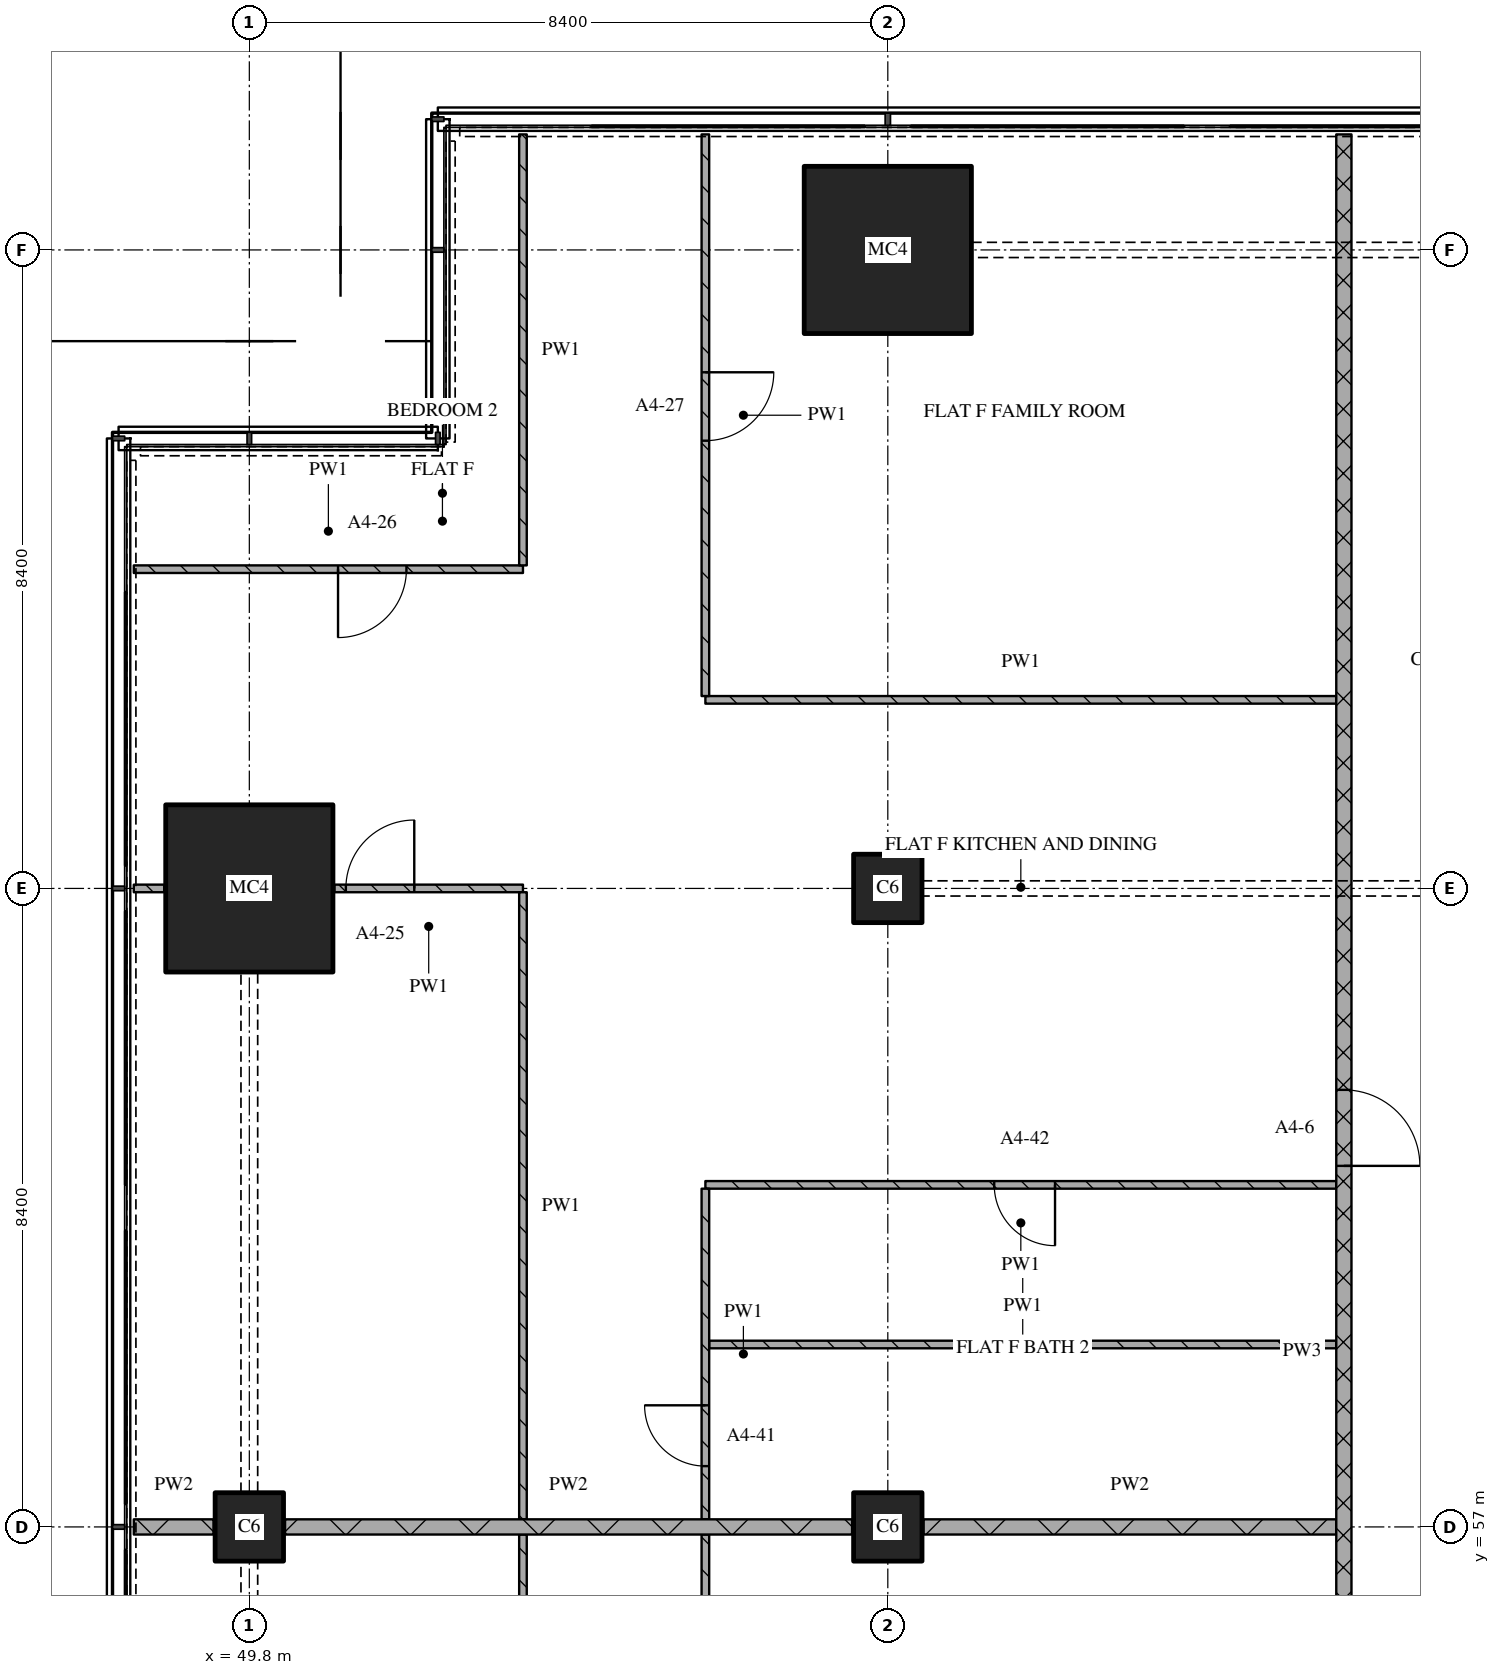
"""IFC4 building model, lengths in metres.
Left out: names, types, materials, properties, quantities, classifications, styles, units other than length and angle.
Written with IfcOpenShell. Run it as: python <this file> out.ifc"""

import sys

from ifc_helpers import new_model, si_unit, direction, frame, frame_2d, origin, origin_2d, place, context, subcontext, project, spatial, rectangle, extrude, element, fill, save


model = new_model("IFC4")
c1 = context("Model", 3, precision=1e-05, world=origin(), true_north=direction((0.0, 1.0)))
c2 = subcontext(c1, "Body", "Model", "MODEL_VIEW")
j1 = project(units=[si_unit("LENGTHUNIT", "METRE"), si_unit("PLANEANGLEUNIT", "RADIAN")], contexts=[c1])
p1 = place(None, origin())
s1 = spatial("IfcSite", under=j1, at=p1, CompositionType="ELEMENT")
p2 = place(p1, origin())
s2 = spatial("IfcBuilding", under=s1, at=p2, CompositionType="ELEMENT")
p3 = place(p2, frame((0.0, 0.0, 69.6)))
s3 = spatial("IfcBuildingStorey", under=s2, at=p3, CompositionType="ELEMENT", Elevation=69.6)
p4 = place(p3, frame((49.8, 57.0, 0.0), z_axis=(0.0, 0.0, 1.0), x_axis=(1.0, 0.0, 0.0)))
e1 = element("IfcColumn", 1, at=p4, inside=s3, PredefinedType="COLUMN", context=c2, shape_type="SweptSolid", body=[
    extrude(rectangle(XDim=0.9, YDim=0.9, at=origin_2d()), origin(), (0.0, 0.0, 1.0), 3.6),
])
p5 = place(p3, frame((49.8, 65.4, 0.0), z_axis=(0.0, 0.0, 1.0), x_axis=(1.0, 0.0, 0.0)))
e2 = element("IfcColumn", 2, at=p5, inside=s3, PredefinedType="COLUMN", context=c2, shape_type="SweptSolid", body=[
    extrude(rectangle(XDim=2.2, YDim=2.2, at=origin_2d()), origin(), (0.0, 0.0, 1.0), 3.6),
])
for number, where, z_axis, x_axis in (
    (3, (58.2, 57.0, 0.0), (0.0, 0.0, 1.0), (1.0, 0.0, 0.0)),
    (4, (58.2, 65.4, 0.0), (0.0, 0.0, 1.0), (1.0, 0.0, 0.0)),
):
    element("IfcColumn", number, at=place(p3, frame(where, z_axis=z_axis, x_axis=x_axis)), inside=s3, PredefinedType="COLUMN", context=c2, shape_type="SweptSolid", body=[
        extrude(rectangle(XDim=0.9, YDim=0.9, at=origin_2d()), origin(), (0.0, 0.0, 1.0), 3.6),
    ])
p6 = place(p3, frame((58.2, 73.8, 0.0), z_axis=(0.0, 0.0, 1.0), x_axis=(1.0, 0.0, 0.0)))
e5 = element("IfcColumn", 5, at=p6, inside=s3, PredefinedType="COLUMN", context=c2, shape_type="SweptSolid", body=[
    extrude(rectangle(XDim=2.2, YDim=2.2, at=origin_2d()), origin(), (0.0, 0.0, 1.0), 3.6),
])
p7 = place(p3, frame((48.28, 57.0, 0.0), z_axis=(0.0, 0.0, 1.0), x_axis=(1.0, 0.0, 0.0)))
e6 = element("IfcWall", 6, at=p7, inside=s3, PredefinedType="PARTITIONING", context=c2, shape_type="SweptSolid", body=[
    extrude(rectangle(XDim=1.05, YDim=0.2, at=frame_2d((0.525, 0.0))), origin(), (0.0, 0.0, 1.0), 3.32),
])
p8 = place(p3, frame((50.27, 57.0, 0.0), z_axis=(0.0, 0.0, 1.0), x_axis=(1.0, 0.0, 0.0)))
e7 = element("IfcWall", 7, at=p8, inside=s3, PredefinedType="PARTITIONING", context=c2, shape_type="SweptSolid", body=[
    extrude(rectangle(XDim=7.46, YDim=0.2, at=frame_2d((3.73, 0.0))), origin(), (0.0, 0.0, 1.0), 3.32),
])
p9 = place(p3, frame((58.67, 57.0, 0.0), z_axis=(0.0, 0.0, 1.0), x_axis=(1.0, 0.0, 0.0)))
e8 = element("IfcWall", 8, at=p9, inside=s3, PredefinedType="PARTITIONING", context=c2, shape_type="SweptSolid", body=[
    extrude(rectangle(XDim=5.43, YDim=0.2, at=frame_2d((2.715, 0.0))), origin(), (0.0, 0.0, 1.0), 3.32),
])
p10 = place(p3, frame((55.85, 59.4, 0.0), z_axis=(0.0, 0.0, 1.0), x_axis=(1.0, 0.0, 0.0)))
e9 = element("IfcWall", 9, at=p10, inside=s3, PredefinedType="PARTITIONING", context=c2, shape_type="SweptSolid", body=[
    extrude(rectangle(XDim=8.25, YDim=0.1, at=frame_2d((4.125, 0.0))), origin(), (0.0, 0.0, 1.0), 3.32),
])
p11 = place(p3, frame((64.1, 61.5, 0.0), z_axis=(0.0, 0.0, 1.0), x_axis=(-1.0, 0.0, 0.0)))
e10 = element("IfcWall", 10, at=p11, inside=s3, PredefinedType="PARTITIONING", context=c2, shape_type="SweptSolid", body=[
    extrude(rectangle(XDim=8.3, YDim=0.1, at=frame_2d((4.15, 0.0))), origin(), (0.0, 0.0, 1.0), 3.32),
])
p12 = place(p11, frame((3.7, 0.0, 0.0)))
e11 = element("IfcOpeningElement", 11, at=p12, cuts=e10, PredefinedType="OPENING", context=c2, shape_type="SweptSolid", body=[
    extrude(rectangle(XDim=0.8, YDim=2.1, at=frame_2d((0.4, 1.05))), frame((0.0, 0.06, 0.0), z_axis=(0.0, -1.0, 0.0), x_axis=(1.0, 0.0, 0.0)), (0.0, 0.0, 1.0), 0.12),
])
p13 = place(p3, frame((48.28, 65.4, 0.0), z_axis=(0.0, 0.0, 1.0), x_axis=(1.0, 0.0, 0.0)))
e12 = element("IfcWall", 12, at=p13, inside=s3, PredefinedType="PARTITIONING", context=c2, shape_type="SweptSolid", body=[
    extrude(rectangle(XDim=0.4, YDim=0.1, at=frame_2d((0.2, 0.0))), origin(), (0.0, 0.0, 1.0), 3.32),
])
p14 = place(p3, frame((53.4, 65.4, 0.0), z_axis=(0.0, 0.0, 1.0), x_axis=(-1.0, 0.0, 0.0)))
e13 = element("IfcWall", 13, at=p14, inside=s3, PredefinedType="PARTITIONING", context=c2, shape_type="SweptSolid", body=[
    extrude(rectangle(XDim=2.48, YDim=0.1, at=frame_2d((1.24, 0.0))), origin(), (0.0, 0.0, 1.0), 3.32),
])
p15 = place(p14, frame((1.43, 0.0, 0.0)))
e14 = element("IfcOpeningElement", 14, at=p15, cuts=e13, PredefinedType="OPENING", context=c2, shape_type="SweptSolid", body=[
    extrude(rectangle(XDim=0.9, YDim=2.1, at=frame_2d((0.45, 1.05))), frame((0.0, 0.06, 0.0), z_axis=(0.0, -1.0, 0.0), x_axis=(1.0, 0.0, 0.0)), (0.0, 0.0, 1.0), 0.12),
])
p16 = place(p3, frame((55.8, 67.881, 0.0), z_axis=(0.0, 0.0, 1.0), x_axis=(1.0, 0.0, 0.0)))
e15 = element("IfcWall", 15, at=p16, inside=s3, PredefinedType="PARTITIONING", context=c2, shape_type="SweptSolid", body=[
    extrude(rectangle(XDim=8.3, YDim=0.1, at=frame_2d((4.15, 0.0))), origin(), (0.0, 0.0, 1.0), 3.32),
])
p17 = place(p3, frame((48.28, 69.6, 0.0), z_axis=(0.0, 0.0, 1.0), x_axis=(1.0, 0.0, 0.0)))
e16 = element("IfcWall", 16, at=p17, inside=s3, PredefinedType="PARTITIONING", context=c2, shape_type="SweptSolid", body=[
    extrude(rectangle(XDim=5.12, YDim=0.1, at=frame_2d((2.56, 0.0))), origin(), (0.0, 0.0, 1.0), 3.32),
])
p18 = place(p17, frame((2.687, 0.0, 0.0)))
e17 = element("IfcOpeningElement", 17, at=p18, cuts=e16, PredefinedType="OPENING", context=c2, shape_type="SweptSolid", body=[
    extrude(rectangle(XDim=0.9, YDim=2.1, at=frame_2d((0.45, 1.05))), frame((0.0, 0.06, 0.0), z_axis=(0.0, -1.0, 0.0), x_axis=(1.0, 0.0, 0.0)), (0.0, 0.0, 1.0), 0.12),
])
p19 = place(p3, frame((53.4, 75.32, 0.0), z_axis=(0.0, 0.0, 1.0), x_axis=(0.0, -1.0, 0.0)))
e18 = element("IfcWall", 18, at=p19, inside=s3, PredefinedType="PARTITIONING", context=c2, shape_type="SweptSolid", body=[
    extrude(rectangle(XDim=5.67, YDim=0.1, at=frame_2d((2.835, 0.0))), origin(), (0.0, 0.0, 1.0), 3.32),
])
p20 = place(p3, frame((55.8, 75.32, 0.0), z_axis=(0.0, 0.0, 1.0), x_axis=(0.0, -1.0, 0.0)))
e19 = element("IfcWall", 19, at=p20, inside=s3, PredefinedType="PARTITIONING", context=c2, shape_type="SweptSolid", body=[
    extrude(rectangle(XDim=7.389, YDim=0.1, at=frame_2d((3.695, 0.0))), origin(), (0.0, 0.0, 1.0), 3.32),
])
p21 = place(p20, frame((3.129, 0.0, 0.0)))
e20 = element("IfcOpeningElement", 20, at=p21, cuts=e19, PredefinedType="OPENING", context=c2, shape_type="SweptSolid", body=[
    extrude(rectangle(XDim=0.9, YDim=2.1, at=frame_2d((0.45, 1.05))), frame((0.0, 0.06, 0.0), z_axis=(0.0, -1.0, 0.0), x_axis=(1.0, 0.0, 0.0)), (0.0, 0.0, 1.0), 0.12),
])
p22 = place(p3, frame((64.2, 43.3, 0.0), z_axis=(0.0, 0.0, 1.0), x_axis=(0.0, 1.0, 0.0)))
e21 = element("IfcWall", 21, at=p22, inside=s3, PredefinedType="PARTITIONING", context=c2, shape_type="SweptSolid", body=[
    extrude(rectangle(XDim=32.02, YDim=0.2, at=frame_2d((16.01, 0.0))), origin(), (0.0, 0.0, 1.0), 3.32),
])
p23 = place(p22, frame((9.15, 0.0, 0.0)))
e22 = element("IfcOpeningElement", 22, at=p23, cuts=e21, PredefinedType="OPENING", context=c2, shape_type="SweptSolid", body=[
    extrude(rectangle(XDim=1.0, YDim=2.1, at=frame_2d((0.5, 1.05))), frame((0.0, 0.11, 0.0), z_axis=(0.0, -1.0, 0.0), x_axis=(1.0, 0.0, 0.0)), (0.0, 0.0, 1.0), 0.22),
])
p24 = place(p22, frame((18.45, 0.0, 0.0)))
e23 = element("IfcOpeningElement", 23, at=p24, cuts=e21, PredefinedType="OPENING", context=c2, shape_type="SweptSolid", body=[
    extrude(rectangle(XDim=1.0, YDim=2.1, at=frame_2d((0.5, 1.05))), frame((0.0, 0.11, 0.0), z_axis=(0.0, -1.0, 0.0), x_axis=(1.0, 0.0, 0.0)), (0.0, 0.0, 1.0), 0.22),
])
for number, where, z_axis, x_axis in (
    (24, (53.4, 56.9, 0.0), (0.0, 0.0, 1.0), (0.0, -1.0, 0.0)),
    (25, (53.4, 65.35, 0.0), (0.0, 0.0, 1.0), (0.0, -1.0, 0.0)),
):
    element("IfcWall", number, at=place(p3, frame(where, z_axis=z_axis, x_axis=x_axis)), inside=s3, PredefinedType="PARTITIONING", context=c2, shape_type="SweptSolid", body=[
        extrude(rectangle(XDim=8.25, YDim=0.1, at=frame_2d((4.125, 0.0))), origin(), (0.0, 0.0, 1.0), 3.32),
    ])
p25 = place(p3, frame((55.8, 56.9, 0.0), z_axis=(0.0, 0.0, 1.0), x_axis=(0.0, -1.0, 0.0)))
e26 = element("IfcWall", 26, at=p25, inside=s3, PredefinedType="PARTITIONING", context=c2, shape_type="SweptSolid", body=[
    extrude(rectangle(XDim=3.15, YDim=0.1, at=frame_2d((1.575, 0.0))), origin(), (0.0, 0.0, 1.0), 3.32),
])
p26 = place(p3, frame((55.8, 61.45, 0.0), z_axis=(0.0, 0.0, 1.0), x_axis=(0.0, -1.0, 0.0)))
e27 = element("IfcWall", 27, at=p26, inside=s3, PredefinedType="PARTITIONING", context=c2, shape_type="SweptSolid", body=[
    extrude(rectangle(XDim=4.35, YDim=0.1, at=frame_2d((2.175, 0.0))), origin(), (0.0, 0.0, 1.0), 3.32),
])
p27 = place(p26, frame((2.85, 0.0, 0.0)))
e28 = element("IfcOpeningElement", 28, at=p27, cuts=e27, PredefinedType="OPENING", context=c2, shape_type="SweptSolid", body=[
    extrude(rectangle(XDim=0.8, YDim=2.1, at=frame_2d((0.4, 1.05))), frame((0.0, 0.06, 0.0), z_axis=(0.0, -1.0, 0.0), x_axis=(1.0, 0.0, 0.0)), (0.0, 0.0, 1.0), 0.12),
])
p28 = place(p12, origin())
e29 = element("IfcDoor", 29, at=p28, inside=s3, OperationType="SINGLE_SWING_LEFT", PredefinedType="DOOR", context=c2, shape_type="SweptSolid", body=[
    extrude(rectangle(XDim=0.8, YDim=2.1, at=frame_2d((0.4, 1.05))), frame((0.0, 0.025, 0.0), z_axis=(0.0, -1.0, 0.0), x_axis=(1.0, 0.0, 0.0)), (0.0, 0.0, 1.0), 0.05),
])
fill(e11, e29)
p29 = place(p15, origin())
e30 = element("IfcDoor", 30, at=p29, inside=s3, OperationType="SINGLE_SWING_RIGHT", PredefinedType="DOOR", context=c2, shape_type="SweptSolid", body=[
    extrude(rectangle(XDim=0.9, YDim=2.1, at=frame_2d((0.45, 1.05))), frame((0.0, 0.025, 0.0), z_axis=(0.0, -1.0, 0.0), x_axis=(1.0, 0.0, 0.0)), (0.0, 0.0, 1.0), 0.05),
])
fill(e14, e30)
p30 = place(p18, origin())
e31 = element("IfcDoor", 31, at=p30, inside=s3, OperationType="SINGLE_SWING_RIGHT", PredefinedType="DOOR", context=c2, shape_type="SweptSolid", body=[
    extrude(rectangle(XDim=0.9, YDim=2.1, at=frame_2d((0.45, 1.05))), frame((0.0, 0.025, 0.0), z_axis=(0.0, -1.0, 0.0), x_axis=(1.0, 0.0, 0.0)), (0.0, 0.0, 1.0), 0.05),
])
fill(e17, e31)
p31 = place(p21, origin())
e32 = element("IfcDoor", 32, at=p31, inside=s3, OperationType="SINGLE_SWING_LEFT", PredefinedType="DOOR", context=c2, shape_type="SweptSolid", body=[
    extrude(rectangle(XDim=0.9, YDim=2.1, at=frame_2d((0.45, 1.05))), frame((0.0, 0.025, 0.0), z_axis=(0.0, -1.0, 0.0), x_axis=(1.0, 0.0, 0.0)), (0.0, 0.0, 1.0), 0.05),
])
fill(e20, e32)
p32 = place(p24, origin())
e33 = element("IfcDoor", 33, at=p32, inside=s3, OperationType="SINGLE_SWING_RIGHT", PredefinedType="DOOR", context=c2, shape_type="SweptSolid", body=[
    extrude(rectangle(XDim=1.0, YDim=2.1, at=frame_2d((0.5, 1.05))), frame((0.0, 0.025, 0.0), z_axis=(0.0, -1.0, 0.0), x_axis=(1.0, 0.0, 0.0)), (0.0, 0.0, 1.0), 0.05),
])
fill(e23, e33)
p33 = place(p27, origin())
e34 = element("IfcDoor", 34, at=p33, inside=s3, OperationType="SINGLE_SWING_RIGHT", PredefinedType="DOOR", context=c2, shape_type="SweptSolid", body=[
    extrude(rectangle(XDim=0.8, YDim=2.1, at=frame_2d((0.4, 1.05))), frame((0.0, 0.025, 0.0), z_axis=(0.0, -1.0, 0.0), x_axis=(1.0, 0.0, 0.0)), (0.0, 0.0, 1.0), 0.05),
])
fill(e28, e34)
save(model, sys.argv[1])
